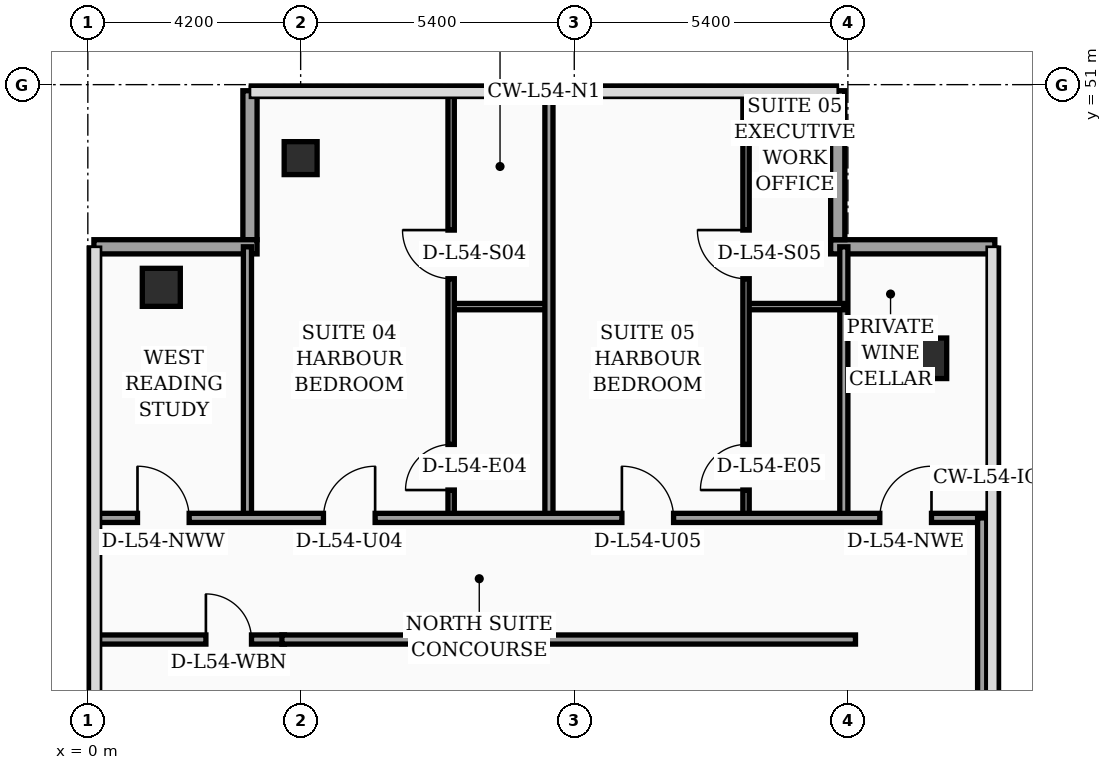
"""IFC4 building model, lengths in metres.
Left out: names, types, materials, properties, quantities, classifications, styles, units other than length and angle.
Written with IfcOpenShell. Run it as: python <this file> out.ifc"""

import sys

from ifc_helpers import new_model, si_unit, direction, frame, frame_2d, origin, origin_2d, place, context, subcontext, project, spatial, rectangle, hollow_rectangle, extrude, element, fill, save


model = new_model("IFC4")
c1 = context("Model", 3, precision=1e-05, world=origin(), true_north=direction((0.0, 1.0)))
c2 = subcontext(c1, "Body", "Model", "MODEL_VIEW")
j1 = project(units=[si_unit("LENGTHUNIT", "METRE"), si_unit("PLANEANGLEUNIT", "RADIAN")], contexts=[c1])
p1 = place(None, origin())
s1 = spatial("IfcSite", under=j1, at=p1, CompositionType="ELEMENT")
p2 = place(p1, origin())
s2 = spatial("IfcBuilding", under=s1, at=p2, CompositionType="ELEMENT")
p3 = place(p2, frame((0.0, 0.0, 219.3)))
s3 = spatial("IfcBuildingStorey", under=s2, at=p3, CompositionType="ELEMENT", Elevation=219.3)
p4 = place(p3, frame((1.45, 47.0, 0.0), z_axis=(0.0, 0.0, 1.0), x_axis=(1.0, 0.0, 0.0)))
e1 = element("IfcColumn", 1, at=p4, inside=s3, PredefinedType="COLUMN", context=c2, shape_type="SweptSolid", body=[
    extrude(hollow_rectangle(XDim=0.75, YDim=0.75, WallThickness=0.032, at=origin_2d()), origin(), (0.0, 0.0, 1.0), 3.56),
])
p5 = place(p3, frame((4.2, 49.55, 0.0), z_axis=(0.0, 0.0, 1.0), x_axis=(1.0, 0.0, 0.0)))
e2 = element("IfcColumn", 2, at=p5, inside=s3, PredefinedType="COLUMN", context=c2, shape_type="SweptSolid", body=[
    extrude(hollow_rectangle(XDim=0.65, YDim=0.65, WallThickness=0.028, at=origin_2d()), origin(), (0.0, 0.0, 1.0), 3.56),
])
p6 = place(p3, frame((16.55, 45.6, 0.0), z_axis=(0.0, 0.0, 1.0), x_axis=(1.0, 0.0, 0.0)))
e3 = element("IfcColumn", 3, at=p6, inside=s3, PredefinedType="COLUMN", context=c2, shape_type="SweptSolid", body=[
    extrude(rectangle(XDim=0.8, YDim=0.8, at=origin_2d()), origin(), (0.0, 0.0, 1.0), 3.56),
])
p7 = place(p3, frame((17.9, 47.8, 0.0), z_axis=(0.0, 0.0, 1.0), x_axis=(-1.0, 0.0, 0.0)))
e4 = element("IfcWall", 4, at=p7, inside=s3, PredefinedType="SOLIDWALL", context=c2, shape_type="SweptSolid", body=[
    extrude(rectangle(XDim=3.24, YDim=0.28, at=frame_2d((1.62, 0.0))), origin(), (0.0, 0.0, 1.0), 3.56),
])
p8 = place(p3, frame((14.8, 47.94, 0.0), z_axis=(0.0, 0.0, 1.0), x_axis=(0.0, 1.0, 0.0)))
e5 = element("IfcWall", 5, at=p8, inside=s3, PredefinedType="SOLIDWALL", context=c2, shape_type="SweptSolid", body=[
    extrude(rectangle(XDim=2.94, YDim=0.28, at=frame_2d((1.47, 0.0))), origin(), (0.0, 0.0, 1.0), 3.56),
])
p9 = place(p3, frame((3.2, 50.88, 0.0), z_axis=(0.0, 0.0, 1.0), x_axis=(0.0, -1.0, 0.0)))
e6 = element("IfcWall", 6, at=p9, inside=s3, PredefinedType="SOLIDWALL", context=c2, shape_type="SweptSolid", body=[
    extrude(rectangle(XDim=2.94, YDim=0.28, at=frame_2d((1.47, 0.0))), origin(), (0.0, 0.0, 1.0), 3.09),
])
p10 = place(p3, frame((3.34, 47.8, 0.0), z_axis=(0.0, 0.0, 1.0), x_axis=(-1.0, 0.0, 0.0)))
e7 = element("IfcWall", 7, at=p10, inside=s3, PredefinedType="SOLIDWALL", context=c2, shape_type="SweptSolid", body=[
    extrude(rectangle(XDim=3.22, YDim=0.28, at=frame_2d((1.61, 0.0))), origin(), (0.0, 0.0, 1.0), 3.09),
])
p11 = place(p3, frame((0.08, 40.05, 0.0), z_axis=(0.0, 0.0, 1.0), x_axis=(1.0, 0.0, 0.0)))
e8 = element("IfcWall", 8, at=p11, inside=s3, PredefinedType="PARTITIONING", context=c2, shape_type="SweptSolid", body=[
    extrude(rectangle(XDim=3.8, YDim=0.18, at=frame_2d((1.9, 0.0))), origin(), (0.0, 0.0, 1.0), 2.94),
])
p12 = place(p11, frame((2.25, 0.0, 0.0)))
e9 = element("IfcOpeningElement", 9, at=p12, cuts=e8, PredefinedType="OPENING", context=c2, shape_type="SweptSolid", body=[
    extrude(rectangle(XDim=0.9, YDim=2.15, at=frame_2d((0.45, 1.075))), frame((0.0, 0.1, 0.0), z_axis=(0.0, -1.0, 0.0), x_axis=(1.0, 0.0, 0.0)), (0.0, 0.0, 1.0), 0.2),
])
p13 = place(p3, frame((3.15, 42.45, 0.0), z_axis=(0.0, 0.0, 1.0), x_axis=(0.0, 1.0, 0.0)))
e10 = element("IfcWall", 10, at=p13, inside=s3, PredefinedType="PARTITIONING", context=c2, shape_type="SweptSolid", body=[
    extrude(rectangle(XDim=5.35, YDim=0.16, at=frame_2d((2.675, 0.0))), origin(), (0.0, 0.0, 1.0), 3.14),
])
p14 = place(p3, frame((14.92, 42.45, 0.0), z_axis=(0.0, 0.0, 1.0), x_axis=(0.0, 1.0, 0.0)))
e11 = element("IfcWall", 11, at=p14, inside=s3, PredefinedType="PARTITIONING", context=c2, shape_type="SweptSolid", body=[
    extrude(rectangle(XDim=5.35, YDim=0.16, at=frame_2d((2.675, 0.0))), origin(), (0.0, 0.0, 1.0), 3.09),
])
p15 = place(p3, frame((7.17, 46.62, 0.0), z_axis=(0.0, 0.0, 1.0), x_axis=(1.0, 0.0, 0.0)))
e12 = element("IfcWall", 12, at=p15, inside=s3, PredefinedType="PARTITIONING", context=c2, shape_type="SweptSolid", body=[
    extrude(rectangle(XDim=1.93, YDim=0.125, at=frame_2d((0.965, 0.0))), origin(), (0.0, 0.0, 1.0), 3.56),
])
p16 = place(p3, frame((7.17, 42.45, 0.0), z_axis=(0.0, 0.0, 1.0), x_axis=(0.0, 1.0, 0.0)))
e13 = element("IfcWall", 13, at=p16, inside=s3, PredefinedType="PARTITIONING", context=c2, shape_type="SweptSolid", body=[
    extrude(rectangle(XDim=8.49, YDim=0.125, at=frame_2d((4.245, 0.0))), origin(), (0.0, 0.0, 1.0), 3.09),
])
p17 = place(p16, frame((0.55, 0.0, 0.0)))
e14 = element("IfcOpeningElement", 14, at=p17, cuts=e13, PredefinedType="OPENING", context=c2, shape_type="SweptSolid", body=[
    extrude(rectangle(XDim=0.9, YDim=2.15, at=frame_2d((0.45, 1.075))), frame((0.0, 0.073, 0.0), z_axis=(0.0, -1.0, 0.0), x_axis=(1.0, 0.0, 0.0)), (0.0, 0.0, 1.0), 0.145),
])
p18 = place(p16, frame((4.72, 0.0, 0.0)))
e15 = element("IfcOpeningElement", 15, at=p18, cuts=e13, PredefinedType="OPENING", context=c2, shape_type="SweptSolid", body=[
    extrude(rectangle(XDim=0.96, YDim=2.2, at=frame_2d((0.48, 1.1))), frame((0.0, 0.073, 0.0), z_axis=(0.0, -1.0, 0.0), x_axis=(1.0, 0.0, 0.0)), (0.0, 0.0, 1.0), 0.145),
])
p19 = place(p3, frame((12.99, 46.62, 0.0), z_axis=(0.0, 0.0, 1.0), x_axis=(1.0, 0.0, 0.0)))
e16 = element("IfcWall", 16, at=p19, inside=s3, PredefinedType="PARTITIONING", context=c2, shape_type="SweptSolid", body=[
    extrude(rectangle(XDim=1.93, YDim=0.125, at=frame_2d((0.965, 0.0))), origin(), (0.0, 0.0, 1.0), 3.09),
])
p20 = place(p3, frame((12.99, 42.45, 0.0), z_axis=(0.0, 0.0, 1.0), x_axis=(0.0, 1.0, 0.0)))
e17 = element("IfcWall", 17, at=p20, inside=s3, PredefinedType="PARTITIONING", context=c2, shape_type="SweptSolid", body=[
    extrude(rectangle(XDim=8.49, YDim=0.125, at=frame_2d((4.245, 0.0))), origin(), (0.0, 0.0, 1.0), 3.09),
])
p21 = place(p20, frame((0.55, 0.0, 0.0)))
e18 = element("IfcOpeningElement", 18, at=p21, cuts=e17, PredefinedType="OPENING", context=c2, shape_type="SweptSolid", body=[
    extrude(rectangle(XDim=0.9, YDim=2.15, at=frame_2d((0.45, 1.075))), frame((0.0, 0.073, 0.0), z_axis=(0.0, -1.0, 0.0), x_axis=(1.0, 0.0, 0.0)), (0.0, 0.0, 1.0), 0.145),
])
p22 = place(p20, frame((4.72, 0.0, 0.0)))
e19 = element("IfcOpeningElement", 19, at=p22, cuts=e17, PredefinedType="OPENING", context=c2, shape_type="SweptSolid", body=[
    extrude(rectangle(XDim=0.96, YDim=2.2, at=frame_2d((0.48, 1.1))), frame((0.0, 0.073, 0.0), z_axis=(0.0, -1.0, 0.0), x_axis=(1.0, 0.0, 0.0)), (0.0, 0.0, 1.0), 0.145),
])
p23 = place(p3, frame((9.1, 42.45, 0.0), z_axis=(0.0, 0.0, 1.0), x_axis=(0.0, 1.0, 0.0)))
e20 = element("IfcWall", 20, at=p23, inside=s3, PredefinedType="PARTITIONING", context=c2, shape_type="SweptSolid", body=[
    extrude(rectangle(XDim=8.49, YDim=0.16, at=frame_2d((4.245, 0.0))), origin(), (0.0, 0.0, 1.0), 3.09),
])
p24 = place(p3, frame((0.08, 42.45, 0.0), z_axis=(0.0, 0.0, 1.0), x_axis=(1.0, 0.0, 0.0)))
e21 = element("IfcWall", 21, at=p24, inside=s3, PredefinedType="PARTITIONING", context=c2, shape_type="SweptSolid", body=[
    extrude(rectangle(XDim=17.77, YDim=0.18, at=frame_2d((8.885, 0.0))), origin(), (0.0, 0.0, 1.0), 2.94),
])
p25 = place(p24, frame((0.9, 0.0, 0.0)))
e22 = element("IfcOpeningElement", 22, at=p25, cuts=e21, PredefinedType="OPENING", context=c2, shape_type="SweptSolid", body=[
    extrude(rectangle(XDim=1.02, YDim=2.2, at=frame_2d((0.51, 1.1))), frame((0.0, 0.1, 0.0), z_axis=(0.0, -1.0, 0.0), x_axis=(1.0, 0.0, 0.0)), (0.0, 0.0, 1.0), 0.2),
])
p26 = place(p24, frame((4.57, 0.0, 0.0)))
e23 = element("IfcOpeningElement", 23, at=p26, cuts=e21, PredefinedType="OPENING", context=c2, shape_type="SweptSolid", body=[
    extrude(rectangle(XDim=1.02, YDim=2.2, at=frame_2d((0.51, 1.1))), frame((0.0, 0.1, 0.0), z_axis=(0.0, -1.0, 0.0), x_axis=(1.0, 0.0, 0.0)), (0.0, 0.0, 1.0), 0.2),
])
p27 = place(p24, frame((10.46, 0.0, 0.0)))
e24 = element("IfcOpeningElement", 24, at=p27, cuts=e21, PredefinedType="OPENING", context=c2, shape_type="SweptSolid", body=[
    extrude(rectangle(XDim=1.02, YDim=2.2, at=frame_2d((0.51, 1.1))), frame((0.0, 0.1, 0.0), z_axis=(0.0, -1.0, 0.0), x_axis=(1.0, 0.0, 0.0)), (0.0, 0.0, 1.0), 0.2),
])
p28 = place(p24, frame((15.55, 0.0, 0.0)))
e25 = element("IfcOpeningElement", 25, at=p28, cuts=e21, PredefinedType="OPENING", context=c2, shape_type="SweptSolid", body=[
    extrude(rectangle(XDim=1.02, YDim=2.2, at=frame_2d((0.51, 1.1))), frame((0.0, 0.1, 0.0), z_axis=(0.0, -1.0, 0.0), x_axis=(1.0, 0.0, 0.0)), (0.0, 0.0, 1.0), 0.2),
])
p29 = place(p3, frame((17.65, 24.3, 0.0), z_axis=(0.0, 0.0, 1.0), x_axis=(0.0, 1.0, 0.0)))
e26 = element("IfcWall", 26, at=p29, inside=s3, PredefinedType="PARTITIONING", context=c2, shape_type="SweptSolid", body=[
    extrude(rectangle(XDim=18.15, YDim=0.18, at=frame_2d((9.075, 0.0))), origin(), (0.0, 0.0, 1.0), 2.94),
])
p30 = place(p29, frame((3.2, 0.0, 0.0)))
e27 = element("IfcOpeningElement", 27, at=p30, cuts=e26, PredefinedType="OPENING", context=c2, shape_type="SweptSolid", body=[
    extrude(rectangle(XDim=1.02, YDim=2.2, at=frame_2d((0.51, 1.1))), frame((0.0, 0.1, 0.0), z_axis=(0.0, -1.0, 0.0), x_axis=(1.0, 0.0, 0.0)), (0.0, 0.0, 1.0), 0.2),
])
p31 = place(p3, frame((3.83, 40.05, 0.0), z_axis=(0.0, 0.0, 1.0), x_axis=(1.0, 0.0, 0.0)))
e28 = element("IfcWall", 28, at=p31, inside=s3, PredefinedType="PARTITIONING", context=c2, shape_type="SweptSolid", body=[
    extrude(rectangle(XDim=11.32, YDim=0.18, at=frame_2d((5.66, 0.0))), origin(), (0.0, 0.0, 1.0), 2.94),
])
p32 = place(p12, origin())
e29 = element("IfcDoor", 29, at=p32, inside=s3, OperationType="SINGLE_SWING_LEFT", PredefinedType="DOOR", context=c2, shape_type="SweptSolid", body=[
    extrude(rectangle(XDim=0.9, YDim=2.15, at=frame_2d((0.45, 1.075))), frame((0.0, 0.025, 0.0), z_axis=(0.0, -1.0, 0.0), x_axis=(1.0, 0.0, 0.0)), (0.0, 0.0, 1.0), 0.05),
])
fill(e9, e29)
p33 = place(p17, origin())
e30 = element("IfcDoor", 30, at=p33, inside=s3, OperationType="SINGLE_SWING_LEFT", PredefinedType="DOOR", context=c2, shape_type="SweptSolid", body=[
    extrude(rectangle(XDim=0.9, YDim=2.15, at=frame_2d((0.45, 1.075))), frame((0.0, 0.025, 0.0), z_axis=(0.0, -1.0, 0.0), x_axis=(1.0, 0.0, 0.0)), (0.0, 0.0, 1.0), 0.05),
])
fill(e14, e30)
p34 = place(p18, origin())
e31 = element("IfcDoor", 31, at=p34, inside=s3, OperationType="SINGLE_SWING_RIGHT", PredefinedType="DOOR", context=c2, shape_type="SweptSolid", body=[
    extrude(rectangle(XDim=0.96, YDim=2.2, at=frame_2d((0.48, 1.1))), frame((0.0, 0.025, 0.0), z_axis=(0.0, -1.0, 0.0), x_axis=(1.0, 0.0, 0.0)), (0.0, 0.0, 1.0), 0.05),
])
fill(e15, e31)
p35 = place(p21, origin())
e32 = element("IfcDoor", 32, at=p35, inside=s3, OperationType="SINGLE_SWING_LEFT", PredefinedType="DOOR", context=c2, shape_type="SweptSolid", body=[
    extrude(rectangle(XDim=0.9, YDim=2.15, at=frame_2d((0.45, 1.075))), frame((0.0, 0.025, 0.0), z_axis=(0.0, -1.0, 0.0), x_axis=(1.0, 0.0, 0.0)), (0.0, 0.0, 1.0), 0.05),
])
fill(e18, e32)
p36 = place(p22, origin())
e33 = element("IfcDoor", 33, at=p36, inside=s3, OperationType="SINGLE_SWING_RIGHT", PredefinedType="DOOR", context=c2, shape_type="SweptSolid", body=[
    extrude(rectangle(XDim=0.96, YDim=2.2, at=frame_2d((0.48, 1.1))), frame((0.0, 0.025, 0.0), z_axis=(0.0, -1.0, 0.0), x_axis=(1.0, 0.0, 0.0)), (0.0, 0.0, 1.0), 0.05),
])
fill(e19, e33)
p37 = place(p25, origin())
e34 = element("IfcDoor", 34, at=p37, inside=s3, OperationType="SINGLE_SWING_LEFT", PredefinedType="DOOR", context=c2, shape_type="SweptSolid", body=[
    extrude(rectangle(XDim=1.02, YDim=2.2, at=frame_2d((0.51, 1.1))), frame((0.0, 0.025, 0.0), z_axis=(0.0, -1.0, 0.0), x_axis=(1.0, 0.0, 0.0)), (0.0, 0.0, 1.0), 0.05),
])
fill(e22, e34)
p38 = place(p26, origin())
e35 = element("IfcDoor", 35, at=p38, inside=s3, OperationType="SINGLE_SWING_RIGHT", PredefinedType="DOOR", context=c2, shape_type="SweptSolid", body=[
    extrude(rectangle(XDim=1.02, YDim=2.2, at=frame_2d((0.51, 1.1))), frame((0.0, 0.025, 0.0), z_axis=(0.0, -1.0, 0.0), x_axis=(1.0, 0.0, 0.0)), (0.0, 0.0, 1.0), 0.05),
])
fill(e23, e35)
p39 = place(p27, origin())
e36 = element("IfcDoor", 36, at=p39, inside=s3, OperationType="SINGLE_SWING_LEFT", PredefinedType="DOOR", context=c2, shape_type="SweptSolid", body=[
    extrude(rectangle(XDim=1.02, YDim=2.2, at=frame_2d((0.51, 1.1))), frame((0.0, 0.025, 0.0), z_axis=(0.0, -1.0, 0.0), x_axis=(1.0, 0.0, 0.0)), (0.0, 0.0, 1.0), 0.05),
])
fill(e24, e36)
p40 = place(p28, origin())
e37 = element("IfcDoor", 37, at=p40, inside=s3, OperationType="SINGLE_SWING_RIGHT", PredefinedType="DOOR", context=c2, shape_type="SweptSolid", body=[
    extrude(rectangle(XDim=1.02, YDim=2.2, at=frame_2d((0.51, 1.1))), frame((0.0, 0.025, 0.0), z_axis=(0.0, -1.0, 0.0), x_axis=(1.0, 0.0, 0.0)), (0.0, 0.0, 1.0), 0.05),
])
fill(e25, e37)
save(model, sys.argv[1])
